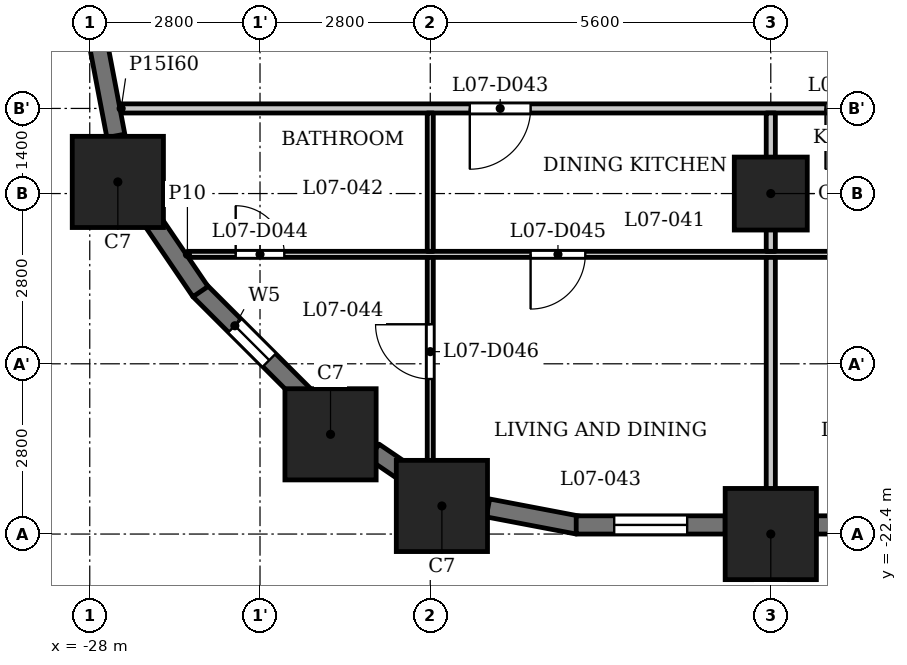
"""IFC4 building model, lengths in metres.
Left out: names, types, materials, properties, quantities, classifications, styles, units other than length and angle.
Written with IfcOpenShell. Run it as: python <this file> out.ifc"""

import sys

from ifc_helpers import new_model, si_unit, direction, frame, frame_2d, origin, origin_2d, place, context, subcontext, project, spatial, rectangle, extrude, element, fill, save


model = new_model("IFC4")
c1 = context("Model", 3, precision=1e-05, world=origin(), true_north=direction((0.0, 1.0)))
c2 = subcontext(c1, "Body", "Model", "MODEL_VIEW")
j1 = project(units=[si_unit("LENGTHUNIT", "METRE"), si_unit("PLANEANGLEUNIT", "RADIAN")], contexts=[c1])
p1 = place(None, origin())
s1 = spatial("IfcSite", under=j1, at=p1, CompositionType="ELEMENT")
p2 = place(p1, origin())
s2 = spatial("IfcBuilding", under=s1, at=p2, CompositionType="ELEMENT")
p3 = place(p2, frame((0.0, 0.0, 34.0)))
s3 = spatial("IfcBuildingStorey", under=s2, at=p3, CompositionType="ELEMENT", Elevation=34.0)
for number, where, z_axis, x_axis in (
    (1, (-22.209, -21.938, 0.0), (0.0, 0.0, 1.0), (1.0, 0.0, 0.0)),
    (2, (-16.8, -22.4, 0.0), (0.0, 0.0, 1.0), (1.0, 0.0, 0.0)),
    (3, (-27.538, -16.609, 0.0), (0.0, 0.0, 1.0), (1.0, 0.0, 0.0)),
    (4, (-24.04, -20.76, 0.0), (0.0, 0.0, 1.0), (1.0, 0.0, 0.0)),
):
    element("IfcColumn", number, at=place(p3, frame(where, z_axis=z_axis, x_axis=x_axis)), inside=s3, PredefinedType="COLUMN", context=c2, shape_type="SweptSolid", body=[
        extrude(rectangle(XDim=1.5, YDim=1.5, at=origin_2d()), origin(), (0.0, 0.0, 1.0), 3.5),
    ])
p4 = place(p3, frame((-16.8, -16.8, 0.0), z_axis=(0.0, 0.0, 1.0), x_axis=(1.0, 0.0, 0.0)))
e5 = element("IfcColumn", 5, at=p4, inside=s3, PredefinedType="COLUMN", context=c2, shape_type="SweptSolid", body=[
    extrude(rectangle(XDim=1.2, YDim=1.2, at=origin_2d()), origin(), (0.0, 0.0, 1.0), 3.5),
])
p5 = place(p3, frame((-26.197, -18.391, 0.0), z_axis=(0.0, 0.0, 1.0), x_axis=(0.707106781187, -0.707106781187, 0.0)))
e6 = element("IfcWall", 6, at=p5, inside=s3, PredefinedType="SOLIDWALL", context=c2, shape_type="SweptSolid", body=[
    extrude(rectangle(XDim=2.45, YDim=0.3, at=frame_2d((1.225, 0.0))), origin(), (0.0, 0.0, 1.0), 2.35),
])
p6 = place(p5, frame((0.825, 0.0, 0.6)))
e7 = element("IfcOpeningElement", 7, at=p6, cuts=e6, PredefinedType="OPENING", context=c2, shape_type="SweptSolid", body=[
    extrude(rectangle(XDim=0.8, YDim=1.55, at=frame_2d((0.4, 0.775))), frame((0.0, 0.16, 0.0), z_axis=(0.0, -1.0, 0.0), x_axis=(1.0, 0.0, 0.0)), (0.0, 0.0, 1.0), 0.32),
])
p7 = place(p3, frame((-23.327, -21.045, 0.0), z_axis=(0.0, 0.0, 1.0), x_axis=(0.827080706709, -0.562083182981, 0.0)))
e8 = element("IfcWall", 8, at=p7, inside=s3, PredefinedType="SOLIDWALL", context=c2, shape_type="SweptSolid", body=[
    extrude(rectangle(XDim=0.677, YDim=0.3, at=frame_2d((0.339, 0.0))), origin(), (0.0, 0.0, 1.0), 3.2),
])
p8 = place(p3, frame((-21.451, -21.97, 0.0), z_axis=(0.0, 0.0, 1.0), x_axis=(0.982287454367, -0.187380247071, 0.0)))
e9 = element("IfcWall", 9, at=p8, inside=s3, PredefinedType="SOLIDWALL", context=c2, shape_type="SweptSolid", body=[
    extrude(rectangle(XDim=1.506, YDim=0.3, at=frame_2d((0.753, 0.0))), origin(), (0.0, 0.0, 1.0), 2.35),
])
p9 = place(p3, frame((-20.0, -22.25, 0.0), z_axis=(0.0, 0.0, 1.0), x_axis=(1.0, 0.0, 0.0)))
e10 = element("IfcWall", 10, at=p9, inside=s3, PredefinedType="SOLIDWALL", context=c2, shape_type="SweptSolid", body=[
    extrude(rectangle(XDim=2.45, YDim=0.3, at=frame_2d((1.225, 0.0))), origin(), (0.0, 0.0, 1.0), 2.35),
])
p10 = place(p9, frame((0.625, 0.0, 0.6)))
e11 = element("IfcOpeningElement", 11, at=p10, cuts=e10, PredefinedType="OPENING", context=c2, shape_type="SweptSolid", body=[
    extrude(rectangle(XDim=1.2, YDim=1.55, at=frame_2d((0.6, 0.775))), frame((0.0, 0.16, 0.0), z_axis=(0.0, -1.0, 0.0), x_axis=(1.0, 0.0, 0.0)), (0.0, 0.0, 1.0), 0.32),
])
p11 = place(p3, frame((-16.05, -22.25, 0.0), z_axis=(0.0, 0.0, 1.0), x_axis=(1.0, 0.0, 0.0)))
e12 = element("IfcWall", 12, at=p11, inside=s3, PredefinedType="SOLIDWALL", context=c2, shape_type="SweptSolid", body=[
    extrude(rectangle(XDim=4.1, YDim=0.3, at=frame_2d((2.05, 0.0))), origin(), (0.0, 0.0, 1.0), 2.35),
])
p12 = place(p11, frame((0.25, 0.0, 1.2)))
e13 = element("IfcOpeningElement", 13, at=p12, cuts=e12, PredefinedType="OPENING", context=c2, shape_type="SweptSolid", body=[
    extrude(rectangle(XDim=3.6, YDim=0.95, at=frame_2d((1.8, 0.475))), frame((0.0, 0.16, 0.0), z_axis=(0.0, -1.0, 0.0), x_axis=(1.0, 0.0, 0.0)), (0.0, 0.0, 1.0), 0.32),
])
for number, where, z_axis, x_axis in (
    (14, (-27.853, -14.372, 0.0), (0.0, 0.0, 1.0), (0.187, -0.982, 0.0)),
    (15, (-27.025, -17.167, 0.0), (0.0, 0.0, 1.0), (0.562, -0.827, 0.0)),
):
    element("IfcWall", number, at=place(p3, frame(where, z_axis=z_axis, x_axis=x_axis)), inside=s3, PredefinedType="SOLIDWALL", context=c2, shape_type="SweptSolid", body=[
        extrude(rectangle(XDim=1.506, YDim=0.3, at=frame_2d((0.753, 0.0))), origin(), (0.0, 0.0, 1.0), 2.35),
    ])
p13 = place(p3, frame((-26.394, -17.8, 0.0), z_axis=(0.0, 0.0, 1.0), x_axis=(1.0, 0.0, 0.0)))
e16 = element("IfcWall", 16, at=p13, inside=s3, PredefinedType="PARTITIONING", context=c2, shape_type="SweptSolid", body=[
    extrude(rectangle(XDim=53.126, YDim=0.1, at=frame_2d((26.563, 0.0))), origin(), (0.0, 0.0, 1.0), 3.2),
])
p14 = place(p13, frame((0.794, 0.0, 0.0)))
e17 = element("IfcOpeningElement", 17, at=p14, cuts=e16, PredefinedType="OPENING", context=c2, shape_type="SweptSolid", body=[
    extrude(rectangle(XDim=0.8, YDim=2.1, at=frame_2d((0.4, 1.05))), frame((0.0, 0.06, 0.0), z_axis=(0.0, -1.0, 0.0), x_axis=(1.0, 0.0, 0.0)), (0.0, 0.0, 1.0), 0.12),
])
p15 = place(p13, frame((5.644, 0.0, 0.0)))
e18 = element("IfcOpeningElement", 18, at=p15, cuts=e16, PredefinedType="OPENING", context=c2, shape_type="SweptSolid", body=[
    extrude(rectangle(XDim=0.9, YDim=2.1, at=frame_2d((0.45, 1.05))), frame((0.0, 0.06, 0.0), z_axis=(0.0, -1.0, 0.0), x_axis=(1.0, 0.0, 0.0)), (0.0, 0.0, 1.0), 0.12),
])
p16 = place(p13, frame((13.244, 0.0, 0.0)))
e19 = element("IfcOpeningElement", 19, at=p16, cuts=e16, PredefinedType="OPENING", context=c2, shape_type="SweptSolid", body=[
    extrude(rectangle(XDim=0.8, YDim=2.1, at=frame_2d((0.4, 1.05))), frame((0.0, 0.06, 0.0), z_axis=(0.0, -1.0, 0.0), x_axis=(1.0, 0.0, 0.0)), (0.0, 0.0, 1.0), 0.12),
])
p17 = place(p13, frame((11.494, 0.0, 0.0)))
e20 = element("IfcOpeningElement", 20, at=p17, cuts=e16, PredefinedType="OPENING", context=c2, shape_type="SweptSolid", body=[
    extrude(rectangle(XDim=0.9, YDim=2.1, at=frame_2d((0.45, 1.05))), frame((0.0, 0.06, 0.0), z_axis=(0.0, -1.0, 0.0), x_axis=(1.0, 0.0, 0.0)), (0.0, 0.0, 1.0), 0.12),
])
p18 = place(p13, frame((19.344, 0.0, 0.0)))
e21 = element("IfcOpeningElement", 21, at=p18, cuts=e16, PredefinedType="OPENING", context=c2, shape_type="SweptSolid", body=[
    extrude(rectangle(XDim=0.8, YDim=2.1, at=frame_2d((0.4, 1.05))), frame((0.0, 0.06, 0.0), z_axis=(0.0, -1.0, 0.0), x_axis=(1.0, 0.0, 0.0)), (0.0, 0.0, 1.0), 0.12),
])
p19 = place(p13, frame((16.094, 0.0, 0.0)))
e22 = element("IfcOpeningElement", 22, at=p19, cuts=e16, PredefinedType="OPENING", context=c2, shape_type="SweptSolid", body=[
    extrude(rectangle(XDim=0.9, YDim=2.1, at=frame_2d((0.45, 1.05))), frame((0.0, 0.06, 0.0), z_axis=(0.0, -1.0, 0.0), x_axis=(1.0, 0.0, 0.0)), (0.0, 0.0, 1.0), 0.12),
])
p20 = place(p13, frame((24.944, 0.0, 0.0)))
e23 = element("IfcOpeningElement", 23, at=p20, cuts=e16, PredefinedType="OPENING", context=c2, shape_type="SweptSolid", body=[
    extrude(rectangle(XDim=0.8, YDim=2.1, at=frame_2d((0.4, 1.05))), frame((0.0, 0.06, 0.0), z_axis=(0.0, -1.0, 0.0), x_axis=(1.0, 0.0, 0.0)), (0.0, 0.0, 1.0), 0.12),
])
p21 = place(p13, frame((22.444, 0.0, 0.0)))
e24 = element("IfcOpeningElement", 24, at=p21, cuts=e16, PredefinedType="OPENING", context=c2, shape_type="SweptSolid", body=[
    extrude(rectangle(XDim=0.9, YDim=2.1, at=frame_2d((0.45, 1.05))), frame((0.0, 0.06, 0.0), z_axis=(0.0, -1.0, 0.0), x_axis=(1.0, 0.0, 0.0)), (0.0, 0.0, 1.0), 0.12),
])
p22 = place(p13, frame((30.294, 0.0, 0.0)))
e25 = element("IfcOpeningElement", 25, at=p22, cuts=e16, PredefinedType="OPENING", context=c2, shape_type="SweptSolid", body=[
    extrude(rectangle(XDim=0.8, YDim=2.1, at=frame_2d((0.4, 1.05))), frame((0.0, 0.06, 0.0), z_axis=(0.0, -1.0, 0.0), x_axis=(1.0, 0.0, 0.0)), (0.0, 0.0, 1.0), 0.12),
])
p23 = place(p13, frame((26.794, 0.0, 0.0)))
e26 = element("IfcOpeningElement", 26, at=p23, cuts=e16, PredefinedType="OPENING", context=c2, shape_type="SweptSolid", body=[
    extrude(rectangle(XDim=0.9, YDim=2.1, at=frame_2d((0.45, 1.05))), frame((0.0, 0.06, 0.0), z_axis=(0.0, -1.0, 0.0), x_axis=(1.0, 0.0, 0.0)), (0.0, 0.0, 1.0), 0.12),
])
p24 = place(p13, frame((32.744, 0.0, 0.0)))
e27 = element("IfcOpeningElement", 27, at=p24, cuts=e16, PredefinedType="OPENING", context=c2, shape_type="SweptSolid", body=[
    extrude(rectangle(XDim=0.8, YDim=2.1, at=frame_2d((0.4, 1.05))), frame((0.0, 0.06, 0.0), z_axis=(0.0, -1.0, 0.0), x_axis=(1.0, 0.0, 0.0)), (0.0, 0.0, 1.0), 0.12),
])
p25 = place(p13, frame((35.594, 0.0, 0.0)))
e28 = element("IfcOpeningElement", 28, at=p25, cuts=e16, PredefinedType="OPENING", context=c2, shape_type="SweptSolid", body=[
    extrude(rectangle(XDim=0.9, YDim=2.1, at=frame_2d((0.45, 1.05))), frame((0.0, 0.06, 0.0), z_axis=(0.0, -1.0, 0.0), x_axis=(1.0, 0.0, 0.0)), (0.0, 0.0, 1.0), 0.12),
])
p26 = place(p13, frame((39.244, 0.0, 0.0)))
e29 = element("IfcOpeningElement", 29, at=p26, cuts=e16, PredefinedType="OPENING", context=c2, shape_type="SweptSolid", body=[
    extrude(rectangle(XDim=0.9, YDim=2.1, at=frame_2d((0.45, 1.05))), frame((0.0, 0.06, 0.0), z_axis=(0.0, -1.0, 0.0), x_axis=(1.0, 0.0, 0.0)), (0.0, 0.0, 1.0), 0.12),
])
p27 = place(p13, frame((41.544, 0.0, 0.0)))
e30 = element("IfcOpeningElement", 30, at=p27, cuts=e16, PredefinedType="OPENING", context=c2, shape_type="SweptSolid", body=[
    extrude(rectangle(XDim=0.9, YDim=2.1, at=frame_2d((0.45, 1.05))), frame((0.0, 0.06, 0.0), z_axis=(0.0, -1.0, 0.0), x_axis=(1.0, 0.0, 0.0)), (0.0, 0.0, 1.0), 0.12),
])
p28 = place(p13, frame((49.362, 0.0, 0.0)))
e31 = element("IfcOpeningElement", 31, at=p28, cuts=e16, PredefinedType="OPENING", context=c2, shape_type="SweptSolid", body=[
    extrude(rectangle(XDim=0.8, YDim=2.1, at=frame_2d((0.4, 1.05))), frame((0.0, 0.06, 0.0), z_axis=(0.0, -1.0, 0.0), x_axis=(1.0, 0.0, 0.0)), (0.0, 0.0, 1.0), 0.12),
])
p29 = place(p13, frame((45.094, 0.0, 0.0)))
e32 = element("IfcOpeningElement", 32, at=p29, cuts=e16, PredefinedType="OPENING", context=c2, shape_type="SweptSolid", body=[
    extrude(rectangle(XDim=0.9, YDim=2.1, at=frame_2d((0.45, 1.05))), frame((0.0, 0.06, 0.0), z_axis=(0.0, -1.0, 0.0), x_axis=(1.0, 0.0, 0.0)), (0.0, 0.0, 1.0), 0.12),
])
p30 = place(p3, frame((-27.484, -15.4, 0.0), z_axis=(0.0, 0.0, 1.0), x_axis=(1.0, 0.0, 0.0)))
e33 = element("IfcWall", 33, at=p30, inside=s3, PredefinedType="PARTITIONING", context=c2, shape_type="SweptSolid", body=[
    extrude(rectangle(XDim=54.968, YDim=0.15, at=frame_2d((27.484, 0.0))), origin(), (0.0, 0.0, 1.0), 3.2),
])
p31 = place(p30, frame((5.734, 0.0, 0.0)))
e34 = element("IfcOpeningElement", 34, at=p31, cuts=e33, PredefinedType="OPENING", context=c2, shape_type="SweptSolid", body=[
    extrude(rectangle(XDim=1.0, YDim=2.1, at=frame_2d((0.5, 1.05))), frame((0.0, 0.085, 0.0), z_axis=(0.0, -1.0, 0.0), x_axis=(1.0, 0.0, 0.0)), (0.0, 0.0, 1.0), 0.17),
])
p32 = place(p30, frame((11.584, 0.0, 0.0)))
e35 = element("IfcOpeningElement", 35, at=p32, cuts=e33, PredefinedType="OPENING", context=c2, shape_type="SweptSolid", body=[
    extrude(rectangle(XDim=1.0, YDim=2.1, at=frame_2d((0.5, 1.05))), frame((0.0, 0.085, 0.0), z_axis=(0.0, -1.0, 0.0), x_axis=(1.0, 0.0, 0.0)), (0.0, 0.0, 1.0), 0.17),
])
p33 = place(p30, frame((17.184, 0.0, 0.0)))
e36 = element("IfcOpeningElement", 36, at=p33, cuts=e33, PredefinedType="OPENING", context=c2, shape_type="SweptSolid", body=[
    extrude(rectangle(XDim=1.0, YDim=2.1, at=frame_2d((0.5, 1.05))), frame((0.0, 0.085, 0.0), z_axis=(0.0, -1.0, 0.0), x_axis=(1.0, 0.0, 0.0)), (0.0, 0.0, 1.0), 0.17),
])
p34 = place(p30, frame((22.534, 0.0, 0.0)))
e37 = element("IfcOpeningElement", 37, at=p34, cuts=e33, PredefinedType="OPENING", context=c2, shape_type="SweptSolid", body=[
    extrude(rectangle(XDim=1.0, YDim=2.1, at=frame_2d((0.5, 1.05))), frame((0.0, 0.085, 0.0), z_axis=(0.0, -1.0, 0.0), x_axis=(1.0, 0.0, 0.0)), (0.0, 0.0, 1.0), 0.17),
])
p35 = place(p30, frame((28.884, 0.0, 0.0)))
e38 = element("IfcOpeningElement", 38, at=p35, cuts=e33, PredefinedType="OPENING", context=c2, shape_type="SweptSolid", body=[
    extrude(rectangle(XDim=1.0, YDim=2.1, at=frame_2d((0.5, 1.05))), frame((0.0, 0.085, 0.0), z_axis=(0.0, -1.0, 0.0), x_axis=(1.0, 0.0, 0.0)), (0.0, 0.0, 1.0), 0.17),
])
p36 = place(p30, frame((39.334, 0.0, 0.0)))
e39 = element("IfcOpeningElement", 39, at=p36, cuts=e33, PredefinedType="OPENING", context=c2, shape_type="SweptSolid", body=[
    extrude(rectangle(XDim=1.0, YDim=2.1, at=frame_2d((0.5, 1.05))), frame((0.0, 0.085, 0.0), z_axis=(0.0, -1.0, 0.0), x_axis=(1.0, 0.0, 0.0)), (0.0, 0.0, 1.0), 0.17),
])
p37 = place(p30, frame((45.184, 0.0, 0.0)))
e40 = element("IfcOpeningElement", 40, at=p37, cuts=e33, PredefinedType="OPENING", context=c2, shape_type="SweptSolid", body=[
    extrude(rectangle(XDim=1.0, YDim=2.1, at=frame_2d((0.5, 1.05))), frame((0.0, 0.085, 0.0), z_axis=(0.0, -1.0, 0.0), x_axis=(1.0, 0.0, 0.0)), (0.0, 0.0, 1.0), 0.17),
])
p38 = place(p3, frame((-22.4, -21.72, 0.0), z_axis=(0.0, 0.0, 1.0), x_axis=(0.0, 1.0, 0.0)))
e41 = element("IfcWall", 41, at=p38, inside=s3, PredefinedType="PARTITIONING", context=c2, shape_type="SweptSolid", body=[
    extrude(rectangle(XDim=3.87, YDim=0.1, at=frame_2d((1.935, 0.0))), origin(), (0.0, 0.0, 1.0), 3.2),
])
p39 = place(p38, frame((1.87, 0.0, 0.0)))
e42 = element("IfcOpeningElement", 42, at=p39, cuts=e41, PredefinedType="OPENING", context=c2, shape_type="SweptSolid", body=[
    extrude(rectangle(XDim=0.9, YDim=2.1, at=frame_2d((0.45, 1.05))), frame((0.0, 0.06, 0.0), z_axis=(0.0, -1.0, 0.0), x_axis=(1.0, 0.0, 0.0)), (0.0, 0.0, 1.0), 0.12),
])
p40 = place(p3, frame((-22.4, -17.75, 0.0), z_axis=(0.0, 0.0, 1.0), x_axis=(0.0, 1.0, 0.0)))
e43 = element("IfcWall", 43, at=p40, inside=s3, PredefinedType="PARTITIONING", context=c2, shape_type="SweptSolid", body=[
    extrude(rectangle(XDim=2.275, YDim=0.1, at=frame_2d((1.137, 0.0))), origin(), (0.0, 0.0, 1.0), 3.2),
])
p41 = place(p3, frame((-16.8, -23.13, 0.0), z_axis=(0.0, 0.0, 1.0), x_axis=(0.0, 1.0, 0.0)))
e44 = element("IfcWall", 44, at=p41, inside=s3, PredefinedType="PARTITIONING", context=c2, shape_type="SweptSolid", body=[
    extrude(rectangle(XDim=5.28, YDim=0.15, at=frame_2d((2.64, 0.0))), origin(), (0.0, 0.0, 1.0), 3.2),
])
p42 = place(p3, frame((-16.8, -17.75, 0.0), z_axis=(0.0, 0.0, 1.0), x_axis=(0.0, 1.0, 0.0)))
e45 = element("IfcWall", 45, at=p42, inside=s3, PredefinedType="PARTITIONING", context=c2, shape_type="SweptSolid", body=[
    extrude(rectangle(XDim=2.275, YDim=0.15, at=frame_2d((1.137, 0.0))), origin(), (0.0, 0.0, 1.0), 3.2),
])
p43 = place(p31, origin())
e46 = element("IfcDoor", 46, at=p43, inside=s3, OperationType="SINGLE_SWING_LEFT", PredefinedType="DOOR", context=c2, shape_type="SweptSolid", body=[
    extrude(rectangle(XDim=1.0, YDim=2.1, at=frame_2d((0.5, 1.05))), frame((0.0, 0.025, 0.0), z_axis=(0.0, -1.0, 0.0), x_axis=(1.0, 0.0, 0.0)), (0.0, 0.0, 1.0), 0.05),
])
fill(e34, e46)
p44 = place(p14, origin())
e47 = element("IfcDoor", 47, at=p44, inside=s3, OperationType="SINGLE_SWING_RIGHT", PredefinedType="DOOR", context=c2, shape_type="SweptSolid", body=[
    extrude(rectangle(XDim=0.8, YDim=2.1, at=frame_2d((0.4, 1.05))), frame((0.0, 0.025, 0.0), z_axis=(0.0, -1.0, 0.0), x_axis=(1.0, 0.0, 0.0)), (0.0, 0.0, 1.0), 0.05),
])
fill(e17, e47)
p45 = place(p15, origin())
e48 = element("IfcDoor", 48, at=p45, inside=s3, OperationType="SINGLE_SWING_LEFT", PredefinedType="DOOR", context=c2, shape_type="SweptSolid", body=[
    extrude(rectangle(XDim=0.9, YDim=2.1, at=frame_2d((0.45, 1.05))), frame((0.0, 0.025, 0.0), z_axis=(0.0, -1.0, 0.0), x_axis=(1.0, 0.0, 0.0)), (0.0, 0.0, 1.0), 0.05),
])
fill(e18, e48)
p46 = place(p39, origin())
e49 = element("IfcDoor", 49, at=p46, inside=s3, OperationType="SINGLE_SWING_LEFT", PredefinedType="DOOR", context=c2, shape_type="SweptSolid", body=[
    extrude(rectangle(XDim=0.9, YDim=2.1, at=frame_2d((0.45, 1.05))), frame((0.0, 0.025, 0.0), z_axis=(0.0, -1.0, 0.0), x_axis=(1.0, 0.0, 0.0)), (0.0, 0.0, 1.0), 0.05),
])
fill(e42, e49)
p47 = place(p32, origin())
e50 = element("IfcDoor", 50, at=p47, inside=s3, OperationType="SINGLE_SWING_LEFT", PredefinedType="DOOR", context=c2, shape_type="SweptSolid", body=[
    extrude(rectangle(XDim=1.0, YDim=2.1, at=frame_2d((0.5, 1.05))), frame((0.0, 0.025, 0.0), z_axis=(0.0, -1.0, 0.0), x_axis=(1.0, 0.0, 0.0)), (0.0, 0.0, 1.0), 0.05),
])
fill(e35, e50)
p48 = place(p6, origin())
e51 = element("IfcWindow", 51, at=p48, inside=s3, PartitioningType="SINGLE_PANEL", PredefinedType="WINDOW", context=c2, shape_type="SweptSolid", body=[
    extrude(rectangle(XDim=0.8, YDim=1.55, at=frame_2d((0.4, 0.775))), frame((0.0, 0.03, 0.0), z_axis=(0.0, -1.0, 0.0), x_axis=(1.0, 0.0, 0.0)), (0.0, 0.0, 1.0), 0.06),
])
fill(e7, e51)
p49 = place(p10, origin())
e52 = element("IfcWindow", 52, at=p49, inside=s3, PartitioningType="SINGLE_PANEL", PredefinedType="WINDOW", context=c2, shape_type="SweptSolid", body=[
    extrude(rectangle(XDim=1.2, YDim=1.55, at=frame_2d((0.6, 0.775))), frame((0.0, 0.03, 0.0), z_axis=(0.0, -1.0, 0.0), x_axis=(1.0, 0.0, 0.0)), (0.0, 0.0, 1.0), 0.06),
])
fill(e11, e52)
save(model, sys.argv[1])
